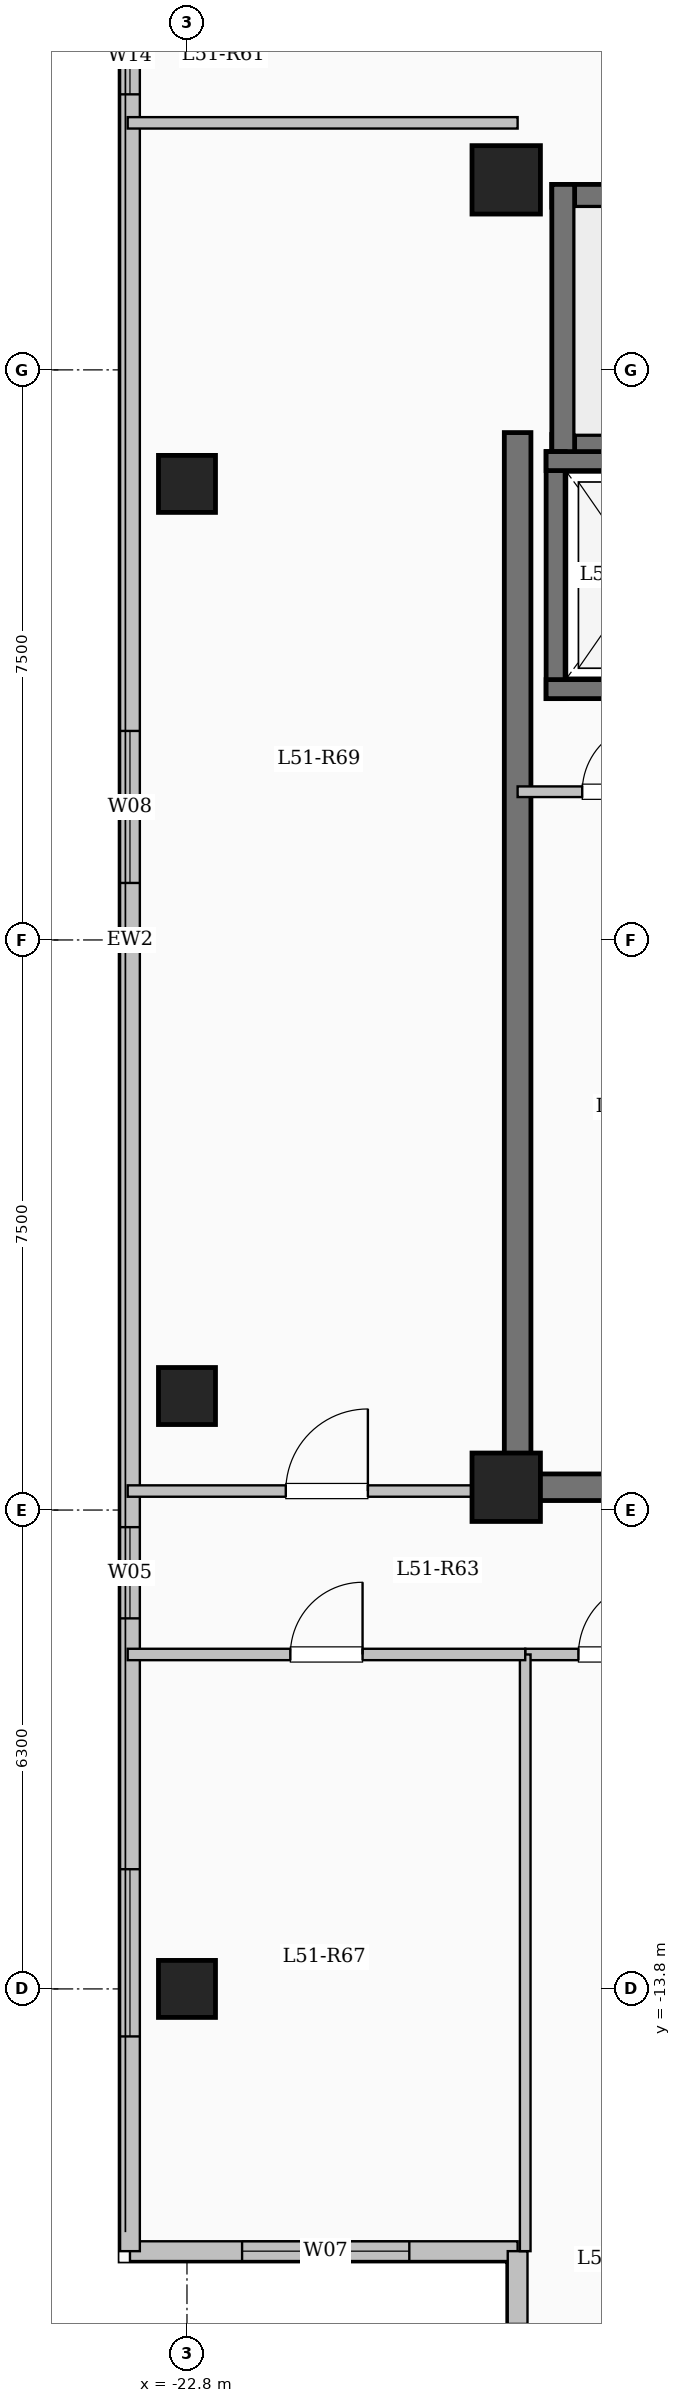
"""IFC4 building model, lengths in metres.
Left out: names, types, materials, properties, quantities, classifications, styles, units other than length and angle.
Written with IfcOpenShell. Run it as: python <this file> out.ifc"""

import sys

from ifc_helpers import new_model, si_unit, direction, frame, frame_2d, origin, origin_2d, place, context, subcontext, project, spatial, rectangle, extrude, element, fill, save


model = new_model("IFC4")
c1 = context("Model", 3, precision=1e-05, world=origin(), true_north=direction((0.0, 1.0)))
c2 = subcontext(c1, "Body", "Model", "MODEL_VIEW")
j1 = project(units=[si_unit("LENGTHUNIT", "METRE"), si_unit("PLANEANGLEUNIT", "RADIAN")], contexts=[c1])
p1 = place(None, origin())
s1 = spatial("IfcSite", under=j1, at=p1, CompositionType="ELEMENT")
p2 = place(p1, origin())
s2 = spatial("IfcBuilding", under=s1, at=p2, CompositionType="ELEMENT")
p3 = place(p2, frame((0.0, 0.0, 190.25)))
s3 = spatial("IfcBuildingStorey", under=s2, at=p3, CompositionType="ELEMENT", Elevation=190.25)
for number, where, z_axis, x_axis in (
    (1, (-18.6, -7.2, 0.0), (0.0, 0.0, 1.0), (1.0, 0.0, 0.0)),
    (2, (-18.6, 10.0, 0.0), (0.0, 0.0, 1.0), (1.0, 0.0, 0.0)),
):
    element("IfcColumn", number, at=place(p3, frame(where, z_axis=z_axis, x_axis=x_axis)), inside=s3, PredefinedType="COLUMN", context=c2, shape_type="SweptSolid", body=[
        extrude(rectangle(XDim=0.9, YDim=0.9, at=origin_2d()), origin(), (0.0, 0.0, 1.0), 3.35),
    ])
for number, where, z_axis, x_axis in (
    (3, (-22.8, -13.8, 0.0), (0.0, 0.0, 1.0), (1.0, 0.0, 0.0)),
    (4, (-22.8, -6.0, 0.0), (0.0, 0.0, 1.0), (1.0, 0.0, 0.0)),
    (5, (-22.8, 6.0, 0.0), (0.0, 0.0, 1.0), (1.0, 0.0, 0.0)),
):
    element("IfcColumn", number, at=place(p3, frame(where, z_axis=z_axis, x_axis=x_axis)), inside=s3, PredefinedType="COLUMN", context=c2, shape_type="SweptSolid", body=[
        extrude(rectangle(XDim=0.75, YDim=0.75, at=origin_2d()), origin(), (0.0, 0.0, 1.0), 3.35),
    ])
p4 = place(p3, frame((-18.45, -17.25, 0.0), z_axis=(0.0, 0.0, 1.0), x_axis=(-1.0, 0.0, 0.0)))
e6 = element("IfcWall", 6, at=p4, inside=s3, PredefinedType="SOLIDWALL", context=c2, shape_type="SweptSolid", body=[
    extrude(rectangle(XDim=5.1, YDim=0.26, at=frame_2d((2.55, 0.0))), origin(), (0.0, 0.0, 1.0), 3.1),
])
p5 = place(p4, frame((1.425, 0.0, 0.9)))
e7 = element("IfcOpeningElement", 7, at=p5, cuts=e6, PredefinedType="OPENING", context=c2, shape_type="SweptSolid", body=[
    extrude(rectangle(XDim=2.2, YDim=1.75, at=frame_2d((1.1, 0.875))), frame((0.0, 0.14, 0.0), z_axis=(0.0, -1.0, 0.0), x_axis=(1.0, 0.0, 0.0)), (0.0, 0.0, 1.0), 0.28),
])
p6 = place(p3, frame((-23.55, -17.25, 0.0), z_axis=(0.0, 0.0, 1.0), x_axis=(0.0, 1.0, 0.0)))
e8 = element("IfcWall", 8, at=p6, inside=s3, PredefinedType="SOLIDWALL", context=c2, shape_type="SweptSolid", body=[
    extrude(rectangle(XDim=34.5, YDim=0.26, at=frame_2d((17.25, 0.0))), origin(), (0.0, 0.0, 1.0), 3.1),
])
p7 = place(p6, frame((2.825, 0.0, 0.9)))
e9 = element("IfcOpeningElement", 9, at=p7, cuts=e8, PredefinedType="OPENING", context=c2, shape_type="SweptSolid", body=[
    extrude(rectangle(XDim=2.2, YDim=1.75, at=frame_2d((1.1, 0.875))), frame((0.0, 0.14, 0.0), z_axis=(0.0, -1.0, 0.0), x_axis=(1.0, 0.0, 0.0)), (0.0, 0.0, 1.0), 0.28),
])
p8 = place(p6, frame((8.325, 0.0, 0.95)))
e10 = element("IfcOpeningElement", 10, at=p8, cuts=e8, PredefinedType="OPENING", context=c2, shape_type="SweptSolid", body=[
    extrude(rectangle(XDim=1.2, YDim=1.5, at=frame_2d((0.6, 0.75))), frame((0.0, 0.14, 0.0), z_axis=(0.0, -1.0, 0.0), x_axis=(1.0, 0.0, 0.0)), (0.0, 0.0, 1.0), 0.28),
])
p9 = place(p6, frame((18.0, 0.0, 0.9)))
e11 = element("IfcOpeningElement", 11, at=p9, cuts=e8, PredefinedType="OPENING", context=c2, shape_type="SweptSolid", body=[
    extrude(rectangle(XDim=2.0, YDim=1.7, at=frame_2d((1.0, 0.85))), frame((0.0, 0.14, 0.0), z_axis=(0.0, -1.0, 0.0), x_axis=(1.0, 0.0, 0.0)), (0.0, 0.0, 1.0), 0.28),
])
p10 = place(p6, frame((28.375, 0.0, 0.95)))
e12 = element("IfcOpeningElement", 12, at=p10, cuts=e8, PredefinedType="OPENING", context=c2, shape_type="SweptSolid", body=[
    extrude(rectangle(XDim=1.0, YDim=1.5, at=frame_2d((0.5, 0.75))), frame((0.0, 0.14, 0.0), z_axis=(0.0, -1.0, 0.0), x_axis=(1.0, 0.0, 0.0)), (0.0, 0.0, 1.0), 0.28),
])
p11 = place(p6, frame((31.125, 0.0, 0.9)))
e13 = element("IfcOpeningElement", 13, at=p11, cuts=e8, PredefinedType="OPENING", context=c2, shape_type="SweptSolid", body=[
    extrude(rectangle(XDim=2.0, YDim=1.7, at=frame_2d((1.0, 0.85))), frame((0.0, 0.14, 0.0), z_axis=(0.0, -1.0, 0.0), x_axis=(1.0, 0.0, 0.0)), (0.0, 0.0, 1.0), 0.28),
])
p12 = place(p3, frame((-18.45, -20.85, 0.0), z_axis=(0.0, 0.0, 1.0), x_axis=(0.0, 1.0, 0.0)))
e14 = element("IfcWall", 14, at=p12, inside=s3, PredefinedType="SOLIDWALL", context=c2, shape_type="SweptSolid", body=[
    extrude(rectangle(XDim=3.6, YDim=0.26, at=frame_2d((1.8, 0.0))), origin(), (0.0, 0.0, 1.0), 3.1),
])
p13 = place(p12, frame((0.992, 0.0, 0.9)))
e15 = element("IfcOpeningElement", 15, at=p13, cuts=e14, PredefinedType="OPENING", context=c2, shape_type="SweptSolid", body=[
    extrude(rectangle(XDim=1.65, YDim=1.6, at=frame_2d((0.825, 0.8))), frame((0.0, 0.14, 0.0), z_axis=(0.0, -1.0, 0.0), x_axis=(1.0, 0.0, 0.0)), (0.0, 0.0, 1.0), 0.28),
])
p14 = place(p3, frame((-18.0, 9.79, 0.0), z_axis=(0.0, 0.0, 1.0), x_axis=(1.0, 0.0, 0.0)))
e16 = element("IfcWall", 16, at=p14, inside=s3, PredefinedType="SHEAR", context=c2, shape_type="SweptSolid", body=[
    extrude(rectangle(XDim=8.0, YDim=0.3, at=frame_2d((4.0, 0.0))), origin(), (0.0, 0.0, 1.0), 3.35),
])
p15 = place(p3, frame((-18.0, 6.5, 0.0), z_axis=(0.0, 0.0, 1.0), x_axis=(1.0, 0.0, 0.0)))
e17 = element("IfcWall", 17, at=p15, inside=s3, PredefinedType="SHEAR", context=c2, shape_type="SweptSolid", body=[
    extrude(rectangle(XDim=8.0, YDim=0.3, at=frame_2d((4.0, 0.0))), origin(), (0.0, 0.0, 1.0), 3.35),
])
p16 = place(p15, frame((6.45, 0.0, 0.0)))
e18 = element("IfcOpeningElement", 18, at=p16, cuts=e17, PredefinedType="OPENING", context=c2, shape_type="SweptSolid", body=[
    extrude(rectangle(XDim=1.0, YDim=2.15, at=frame_2d((0.5, 1.075))), frame((0.0, 0.16, 0.0), z_axis=(0.0, -1.0, 0.0), x_axis=(1.0, 0.0, 0.0)), (0.0, 0.0, 1.0), 0.32),
])
p17 = place(p3, frame((-17.85, 6.35, 0.0), z_axis=(0.0, 0.0, 1.0), x_axis=(0.0, 1.0, 0.0)))
e19 = element("IfcWall", 19, at=p17, inside=s3, PredefinedType="SHEAR", context=c2, shape_type="SweptSolid", body=[
    extrude(rectangle(XDim=3.59, YDim=0.3, at=frame_2d((1.795, 0.0))), origin(), (0.0, 0.0, 1.0), 3.35),
])
p18 = place(p3, frame((-17.95, 3.175, 0.0), z_axis=(0.0, 0.0, 1.0), x_axis=(0.0, 1.0, 0.0)))
e20 = element("IfcWall", 20, at=p18, inside=s3, PredefinedType="SHEAR", context=c2, shape_type="SweptSolid", body=[
    extrude(rectangle(XDim=3.25, YDim=0.25, at=frame_2d((1.625, 0.0))), origin(), (0.0, 0.0, 1.0), 3.35),
])
for number, where, z_axis, x_axis in (
    (21, (-18.075, 3.3, 0.0), (0.0, 0.0, 1.0), (1.0, 0.0, 0.0)),
    (22, (-18.075, 6.3, 0.0), (0.0, 0.0, 1.0), (1.0, 0.0, 0.0)),
):
    element("IfcWall", number, at=place(p3, frame(where, z_axis=z_axis, x_axis=x_axis)), inside=s3, PredefinedType="SHEAR", context=c2, shape_type="SweptSolid", body=[
        extrude(rectangle(XDim=2.55, YDim=0.25, at=frame_2d((1.275, 0.0))), origin(), (0.0, 0.0, 1.0), 3.35),
    ])
p19 = place(p3, frame((-18.45, -7.375, 0.0), z_axis=(0.0, 0.0, 1.0), x_axis=(0.0, 1.0, 0.0)))
e23 = element("IfcWall", 23, at=p19, inside=s3, PredefinedType="SHEAR", context=c2, shape_type="SweptSolid", body=[
    extrude(rectangle(XDim=14.05, YDim=0.35, at=frame_2d((7.025, 0.0))), origin(), (0.0, 0.0, 1.0), 3.35),
])
p20 = place(p3, frame((-18.625, -7.2, 0.0), z_axis=(0.0, 0.0, 1.0), x_axis=(1.0, 0.0, 0.0)))
e24 = element("IfcWall", 24, at=p20, inside=s3, PredefinedType="SHEAR", context=c2, shape_type="SweptSolid", body=[
    extrude(rectangle(XDim=8.55, YDim=0.35, at=frame_2d((4.275, 0.0))), origin(), (0.0, 0.0, 1.0), 3.35),
])
p21 = place(p20, frame((1.725, 0.0, 0.0)))
e25 = element("IfcOpeningElement", 25, at=p21, cuts=e24, PredefinedType="OPENING", context=c2, shape_type="SweptSolid", body=[
    extrude(rectangle(XDim=1.12, YDim=2.15, at=frame_2d((0.56, 1.075))), frame((0.0, 0.185, 0.0), z_axis=(0.0, -1.0, 0.0), x_axis=(1.0, 0.0, 0.0)), (0.0, 0.0, 1.0), 0.37),
])
p22 = place(p3, frame((-18.45, 1.95, 0.0), z_axis=(0.0, 0.0, 1.0), x_axis=(1.0, 0.0, 0.0)))
e26 = element("IfcWall", 26, at=p22, inside=s3, PredefinedType="PARTITIONING", context=c2, shape_type="SweptSolid", body=[
    extrude(rectangle(XDim=3.15, YDim=0.14, at=frame_2d((1.575, 0.0))), origin(), (0.0, 0.0, 1.0), 3.1),
])
p23 = place(p22, frame((0.85, 0.0, 0.0)))
e27 = element("IfcOpeningElement", 27, at=p23, cuts=e26, PredefinedType="OPENING", context=c2, shape_type="SweptSolid", body=[
    extrude(rectangle(XDim=0.9, YDim=2.08, at=frame_2d((0.45, 1.04))), frame((0.0, 0.08, 0.0), z_axis=(0.0, -1.0, 0.0), x_axis=(1.0, 0.0, 0.0)), (0.0, 0.0, 1.0), 0.16),
])
p24 = place(p3, frame((-18.35, -9.4, 0.0), z_axis=(0.0, 0.0, 1.0), x_axis=(1.0, 0.0, 0.0)))
e28 = element("IfcWall", 28, at=p24, inside=s3, PredefinedType="PARTITIONING", context=c2, shape_type="SweptSolid", body=[
    extrude(rectangle(XDim=9.8, YDim=0.15, at=frame_2d((4.9, 0.0))), origin(), (0.0, 0.0, 1.0), 3.1),
])
p25 = place(p24, frame((0.7, 0.0, 0.0)))
e29 = element("IfcOpeningElement", 29, at=p25, cuts=e28, PredefinedType="OPENING", context=c2, shape_type="SweptSolid", body=[
    extrude(rectangle(XDim=0.96, YDim=2.15, at=frame_2d((0.48, 1.075))), frame((0.0, 0.085, 0.0), z_axis=(0.0, -1.0, 0.0), x_axis=(1.0, 0.0, 0.0)), (0.0, 0.0, 1.0), 0.17),
])
p26 = place(p24, frame((5.38, 0.0, 0.0)))
e30 = element("IfcOpeningElement", 30, at=p26, cuts=e28, PredefinedType="OPENING", context=c2, shape_type="SweptSolid", body=[
    extrude(rectangle(XDim=0.96, YDim=2.15, at=frame_2d((0.48, 1.075))), frame((0.0, 0.085, 0.0), z_axis=(0.0, -1.0, 0.0), x_axis=(1.0, 0.0, 0.0)), (0.0, 0.0, 1.0), 0.17),
])
p27 = place(p3, frame((-23.58, -7.25, 0.0), z_axis=(0.0, 0.0, 1.0), x_axis=(1.0, 0.0, 0.0)))
e31 = element("IfcWall", 31, at=p27, inside=s3, PredefinedType="PARTITIONING", context=c2, shape_type="SweptSolid", body=[
    extrude(rectangle(XDim=5.13, YDim=0.15, at=frame_2d((2.565, 0.0))), origin(), (0.0, 0.0, 1.0), 3.1),
])
p28 = place(p27, frame((2.08, 0.0, 0.0)))
e32 = element("IfcOpeningElement", 32, at=p28, cuts=e31, PredefinedType="OPENING", context=c2, shape_type="SweptSolid", body=[
    extrude(rectangle(XDim=1.08, YDim=2.15, at=frame_2d((0.54, 1.075))), frame((0.0, 0.085, 0.0), z_axis=(0.0, -1.0, 0.0), x_axis=(1.0, 0.0, 0.0)), (0.0, 0.0, 1.0), 0.17),
])
p29 = place(p3, frame((-23.58, 10.75, 0.0), z_axis=(0.0, 0.0, 1.0), x_axis=(1.0, 0.0, 0.0)))
e33 = element("IfcWall", 33, at=p29, inside=s3, PredefinedType="PARTITIONING", context=c2, shape_type="SweptSolid", body=[
    extrude(rectangle(XDim=5.13, YDim=0.15, at=frame_2d((2.565, 0.0))), origin(), (0.0, 0.0, 1.0), 3.1),
])
p30 = place(p3, frame((-18.35, -17.25, 0.0), z_axis=(0.0, 0.0, 1.0), x_axis=(0.0, 1.0, 0.0)))
e34 = element("IfcWall", 34, at=p30, inside=s3, PredefinedType="PARTITIONING", context=c2, shape_type="SweptSolid", body=[
    extrude(rectangle(XDim=7.85, YDim=0.14, at=frame_2d((3.925, 0.0))), origin(), (0.0, 0.0, 1.0), 3.1),
])
p31 = place(p3, frame((-23.58, -9.4, 0.0), z_axis=(0.0, 0.0, 1.0), x_axis=(1.0, 0.0, 0.0)))
e35 = element("IfcWall", 35, at=p31, inside=s3, PredefinedType="PARTITIONING", context=c2, shape_type="SweptSolid", body=[
    extrude(rectangle(XDim=5.23, YDim=0.15, at=frame_2d((2.615, 0.0))), origin(), (0.0, 0.0, 1.0), 3.1),
])
p32 = place(p31, frame((2.14, 0.0, 0.0)))
e36 = element("IfcOpeningElement", 36, at=p32, cuts=e35, PredefinedType="OPENING", context=c2, shape_type="SweptSolid", body=[
    extrude(rectangle(XDim=0.95, YDim=2.15, at=frame_2d((0.475, 1.075))), frame((0.0, 0.085, 0.0), z_axis=(0.0, -1.0, 0.0), x_axis=(1.0, 0.0, 0.0)), (0.0, 0.0, 1.0), 0.17),
])
p33 = place(p5, origin())
e37 = element("IfcWindow", 37, at=p33, inside=s3, PartitioningType="SINGLE_PANEL", PredefinedType="WINDOW", context=c2, shape_type="SweptSolid", body=[
    extrude(rectangle(XDim=2.2, YDim=1.75, at=frame_2d((1.1, 0.875))), frame((0.0, 0.03, 0.0), z_axis=(0.0, -1.0, 0.0), x_axis=(1.0, 0.0, 0.0)), (0.0, 0.0, 1.0), 0.06),
])
fill(e7, e37)
p34 = place(p7, origin())
e38 = element("IfcWindow", 38, at=p34, inside=s3, PartitioningType="SINGLE_PANEL", PredefinedType="WINDOW", context=c2, shape_type="SweptSolid", body=[
    extrude(rectangle(XDim=2.2, YDim=1.75, at=frame_2d((1.1, 0.875))), frame((0.0, 0.03, 0.0), z_axis=(0.0, -1.0, 0.0), x_axis=(1.0, 0.0, 0.0)), (0.0, 0.0, 1.0), 0.06),
])
fill(e9, e38)
p35 = place(p8, origin())
e39 = element("IfcWindow", 39, at=p35, inside=s3, PartitioningType="SINGLE_PANEL", PredefinedType="WINDOW", context=c2, shape_type="SweptSolid", body=[
    extrude(rectangle(XDim=1.2, YDim=1.5, at=frame_2d((0.6, 0.75))), frame((0.0, 0.03, 0.0), z_axis=(0.0, -1.0, 0.0), x_axis=(1.0, 0.0, 0.0)), (0.0, 0.0, 1.0), 0.06),
])
fill(e10, e39)
p36 = place(p9, origin())
e40 = element("IfcWindow", 40, at=p36, inside=s3, PartitioningType="SINGLE_PANEL", PredefinedType="WINDOW", context=c2, shape_type="SweptSolid", body=[
    extrude(rectangle(XDim=2.0, YDim=1.7, at=frame_2d((1.0, 0.85))), frame((0.0, 0.03, 0.0), z_axis=(0.0, -1.0, 0.0), x_axis=(1.0, 0.0, 0.0)), (0.0, 0.0, 1.0), 0.06),
])
fill(e11, e40)
p37 = place(p10, origin())
e41 = element("IfcWindow", 41, at=p37, inside=s3, PartitioningType="SINGLE_PANEL", PredefinedType="WINDOW", context=c2, shape_type="SweptSolid", body=[
    extrude(rectangle(XDim=1.0, YDim=1.5, at=frame_2d((0.5, 0.75))), frame((0.0, 0.03, 0.0), z_axis=(0.0, -1.0, 0.0), x_axis=(1.0, 0.0, 0.0)), (0.0, 0.0, 1.0), 0.06),
])
fill(e12, e41)
p38 = place(p23, origin())
e42 = element("IfcDoor", 42, at=p38, inside=s3, OperationType="SINGLE_SWING_RIGHT", PredefinedType="DOOR", context=c2, shape_type="SweptSolid", body=[
    extrude(rectangle(XDim=0.9, YDim=2.08, at=frame_2d((0.45, 1.04))), frame((0.0, 0.025, 0.0), z_axis=(0.0, -1.0, 0.0), x_axis=(1.0, 0.0, 0.0)), (0.0, 0.0, 1.0), 0.05),
])
fill(e27, e42)
p39 = place(p25, origin())
e43 = element("IfcDoor", 43, at=p39, inside=s3, OperationType="SINGLE_SWING_RIGHT", PredefinedType="DOOR", context=c2, shape_type="SweptSolid", body=[
    extrude(rectangle(XDim=0.96, YDim=2.15, at=frame_2d((0.48, 1.075))), frame((0.0, 0.025, 0.0), z_axis=(0.0, -1.0, 0.0), x_axis=(1.0, 0.0, 0.0)), (0.0, 0.0, 1.0), 0.05),
])
fill(e29, e43)
p40 = place(p32, origin())
e44 = element("IfcDoor", 44, at=p40, inside=s3, OperationType="SINGLE_SWING_RIGHT", PredefinedType="DOOR", context=c2, shape_type="SweptSolid", body=[
    extrude(rectangle(XDim=0.95, YDim=2.15, at=frame_2d((0.475, 1.075))), frame((0.0, 0.025, 0.0), z_axis=(0.0, -1.0, 0.0), x_axis=(1.0, 0.0, 0.0)), (0.0, 0.0, 1.0), 0.05),
])
fill(e36, e44)
p41 = place(p28, origin())
e45 = element("IfcDoor", 45, at=p41, inside=s3, OperationType="SINGLE_SWING_RIGHT", PredefinedType="DOOR", context=c2, shape_type="SweptSolid", body=[
    extrude(rectangle(XDim=1.08, YDim=2.15, at=frame_2d((0.54, 1.075))), frame((0.0, 0.025, 0.0), z_axis=(0.0, -1.0, 0.0), x_axis=(1.0, 0.0, 0.0)), (0.0, 0.0, 1.0), 0.05),
])
fill(e32, e45)
save(model, sys.argv[1])
